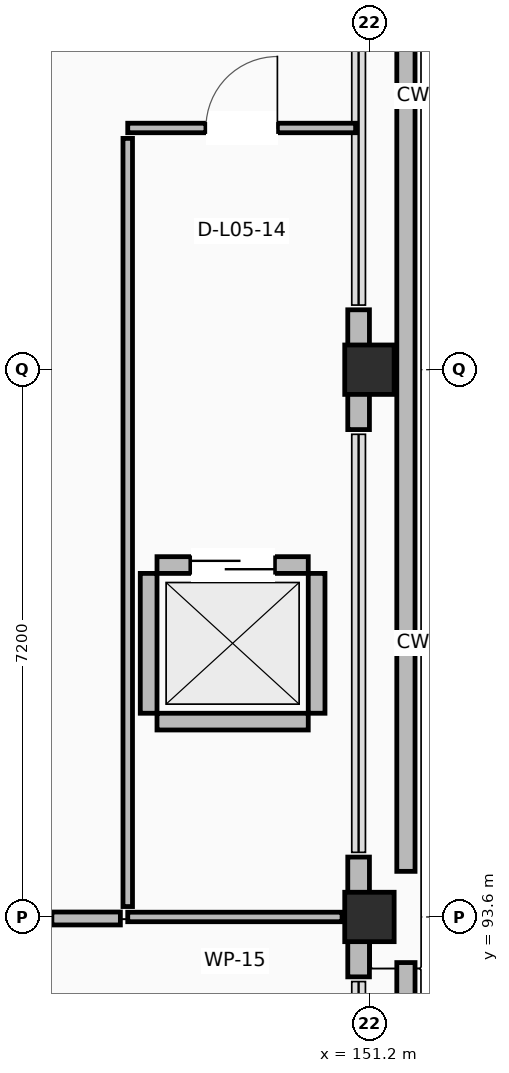
"""IFC4 building model, lengths in metres.
Left out: names, types, materials, properties, quantities, classifications, styles, units other than length and angle.
Written with IfcOpenShell. Run it as: python <this file> out.ifc"""

import sys

from ifc_helpers import new_model, si_unit, direction, frame, frame_2d, origin, origin_2d, place, context, subcontext, project, spatial, rectangle, extrude, element, fill, save


model = new_model("IFC4")
c1 = context("Model", 3, precision=1e-05, world=origin(), true_north=direction((0.0, 1.0)))
c2 = subcontext(c1, "Body", "Model", "MODEL_VIEW")
j1 = project(units=[si_unit("LENGTHUNIT", "METRE"), si_unit("PLANEANGLEUNIT", "RADIAN")], contexts=[c1])
p1 = place(None, origin())
s1 = spatial("IfcSite", under=j1, at=p1, CompositionType="ELEMENT")
p2 = place(p1, origin())
s2 = spatial("IfcBuilding", under=s1, at=p2, CompositionType="ELEMENT")
p3 = place(p2, frame((0.0, 0.0, 22.5)))
s3 = spatial("IfcBuildingStorey", under=s2, at=p3, CompositionType="ELEMENT", Elevation=22.5)
for number, where, z_axis, x_axis in (
    (1, (151.2, 93.6, 0.0), (0.0, 0.0, 1.0), (1.0, 0.0, 0.0)),
    (2, (151.2, 100.8, 0.0), (0.0, 0.0, 1.0), (1.0, 0.0, 0.0)),
):
    element("IfcColumn", number, at=place(p3, frame(where, z_axis=z_axis, x_axis=x_axis)), inside=s3, PredefinedType="COLUMN", context=c2, shape_type="SweptSolid", body=[
        extrude(rectangle(XDim=0.65, YDim=0.65, at=origin_2d()), origin(), (0.0, 0.0, 1.0), 4.22),
    ])
p4 = place(p3, frame((151.058, 92.812, 0.0), z_axis=(0.0, 0.0, 1.0), x_axis=(0.0, 1.0, 0.0)))
e3 = element("IfcWall", 3, at=p4, inside=s3, PredefinedType="STANDARD", context=c2, shape_type="SweptSolid", body=[
    extrude(rectangle(XDim=0.788, YDim=0.285, at=frame_2d((0.394, 0.0))), origin(), (0.0, 0.0, 1.0), 3.26),
])
p5 = place(p3, frame((151.058, 93.6, 0.0), z_axis=(0.0, 0.0, 1.0), x_axis=(0.0, 1.0, 0.0)))
e4 = element("IfcWall", 4, at=p5, inside=s3, PredefinedType="STANDARD", context=c2, shape_type="SweptSolid", body=[
    extrude(rectangle(XDim=0.788, YDim=0.285, at=frame_2d((0.394, 0.0))), origin(), (0.0, 0.0, 1.0), 3.26),
])
p6 = place(p3, frame((151.058, 100.012, 0.0), z_axis=(0.0, 0.0, 1.0), x_axis=(0.0, 1.0, 0.0)))
e5 = element("IfcWall", 5, at=p6, inside=s3, PredefinedType="STANDARD", context=c2, shape_type="SweptSolid", body=[
    extrude(rectangle(XDim=1.576, YDim=0.285, at=frame_2d((0.788, 0.0))), origin(), (0.0, 0.0, 1.0), 3.26),
])
p7 = place(p3, frame((151.68, 115.56, 0.0), z_axis=(0.0, 0.0, 1.0), x_axis=(0.0, -1.0, 0.0)))
e6 = element("IfcWall", 6, at=p7, inside=s3, PredefinedType="PARAPET", context=c2, shape_type="SweptSolid", body=[
    extrude(rectangle(XDim=21.36, YDim=0.24, at=frame_2d((10.68, 0.0))), origin(), (0.0, 0.0, 1.0), 1.12),
])
p8 = place(p3, frame((151.68, 93.0, 0.0), z_axis=(0.0, 0.0, 1.0), x_axis=(0.0, -1.0, 0.0)))
e7 = element("IfcWall", 7, at=p8, inside=s3, PredefinedType="PARAPET", context=c2, shape_type="SweptSolid", body=[
    extrude(rectangle(XDim=6.96, YDim=0.24, at=frame_2d((3.48, 0.0))), origin(), (0.0, 0.0, 1.0), 1.12),
])
p9 = place(p3, frame((148.405, 96.17, 0.0), z_axis=(0.0, 0.0, 1.0), x_axis=(1.0, 0.0, 0.0)))
e8 = element("IfcWall", 8, at=p9, inside=s3, PredefinedType="STANDARD", context=c2, shape_type="SweptSolid", body=[
    extrude(rectangle(XDim=1.99, YDim=0.22, at=frame_2d((0.995, 0.0))), origin(), (0.0, 0.0, 1.0), 3.26),
])
p10 = place(p3, frame((148.405, 98.23, 0.0), z_axis=(0.0, 0.0, 1.0), x_axis=(1.0, 0.0, 0.0)))
e9 = element("IfcWall", 9, at=p10, inside=s3, PredefinedType="STANDARD", context=c2, shape_type="SweptSolid", body=[
    extrude(rectangle(XDim=1.99, YDim=0.22, at=frame_2d((0.995, 0.0))), origin(), (0.0, 0.0, 1.0), 3.26),
])
p11 = place(p10, frame((0.445, 0.0, 0.0)))
e10 = element("IfcOpeningElement", 10, at=p11, cuts=e9, PredefinedType="OPENING", context=c2, shape_type="SweptSolid", body=[
    extrude(rectangle(XDim=1.1, YDim=2.15, at=frame_2d((0.55, 1.075))), frame((0.0, 0.12, 0.0), z_axis=(0.0, -1.0, 0.0), x_axis=(1.0, 0.0, 0.0)), (0.0, 0.0, 1.0), 0.24),
])
for number, where, z_axis, x_axis in (
    (11, (148.295, 96.28, 0.0), (0.0, 0.0, 1.0), (0.0, 1.0, 0.0)),
    (12, (150.505, 96.28, 0.0), (0.0, 0.0, 1.0), (0.0, 1.0, 0.0)),
):
    element("IfcWall", number, at=place(p3, frame(where, z_axis=z_axis, x_axis=x_axis)), inside=s3, PredefinedType="STANDARD", context=c2, shape_type="SweptSolid", body=[
        extrude(rectangle(XDim=1.84, YDim=0.22, at=frame_2d((0.92, 0.0))), origin(), (0.0, 0.0, 1.0), 3.26),
    ])
p12 = place(p3, frame((148.02, 103.98, 0.0), z_axis=(0.0, 0.0, 1.0), x_axis=(1.0, 0.0, 0.0)))
e13 = element("IfcWall", 13, at=p12, inside=s3, PredefinedType="PARTITIONING", context=c2, shape_type="SweptSolid", body=[
    extrude(rectangle(XDim=2.998, YDim=0.125, at=frame_2d((1.499, 0.0))), origin(), (0.0, 0.0, 1.0), 3.26),
])
p13 = place(p12, frame((1.029, 0.0, 0.0)))
e14 = element("IfcOpeningElement", 14, at=p13, cuts=e13, PredefinedType="OPENING", context=c2, shape_type="SweptSolid", body=[
    extrude(rectangle(XDim=0.94, YDim=2.1, at=frame_2d((0.47, 1.05))), frame((0.0, 0.073, 0.0), z_axis=(0.0, -1.0, 0.0), x_axis=(1.0, 0.0, 0.0)), (0.0, 0.0, 1.0), 0.145),
])
p14 = place(p3, frame((150.84, 93.6, 0.0), z_axis=(0.0, 0.0, 1.0), x_axis=(-1.0, 0.0, 0.0)))
e15 = element("IfcWall", 15, at=p14, inside=s3, PredefinedType="PARTITIONING", context=c2, shape_type="SweptSolid", body=[
    extrude(rectangle(XDim=2.82, YDim=0.125, at=frame_2d((1.41, 0.0))), origin(), (0.0, 0.0, 1.0), 3.26),
])
p15 = place(p3, frame((148.02, 93.737, 0.0), z_axis=(0.0, 0.0, 1.0), x_axis=(0.0, 1.0, 0.0)))
e16 = element("IfcWall", 16, at=p15, inside=s3, PredefinedType="PARTITIONING", context=c2, shape_type="SweptSolid", body=[
    extrude(rectangle(XDim=10.106, YDim=0.125, at=frame_2d((5.053, 0.0))), origin(), (0.0, 0.0, 1.0), 3.26),
])
p16 = place(p3, frame((145.0, 93.58, 0.0), z_axis=(0.0, 0.0, 1.0), x_axis=(1.0, 0.0, 0.0)))
e17 = element("IfcWall", 17, at=p16, inside=s3, PredefinedType="PARTITIONING", context=c2, shape_type="SweptSolid", body=[
    extrude(rectangle(XDim=2.923, YDim=0.17, at=frame_2d((1.461, 0.0))), origin(), (0.0, 0.0, 1.0), 3.26),
])
p17 = place(p16, frame((0.902, 0.0, 0.0)))
e18 = element("IfcOpeningElement", 18, at=p17, cuts=e17, PredefinedType="OPENING", context=c2, shape_type="SweptSolid", body=[
    extrude(rectangle(XDim=1.12, YDim=2.15, at=frame_2d((0.56, 1.075))), frame((0.0, 0.095, 0.0), z_axis=(0.0, -1.0, 0.0), x_axis=(1.0, 0.0, 0.0)), (0.0, 0.0, 1.0), 0.19),
])
p18 = place(p11, origin())
e19 = element("IfcDoor", 19, at=p18, inside=s3, OperationType="SLIDING_TO_RIGHT", PredefinedType="DOOR", context=c2, shape_type="SweptSolid", body=[
    extrude(rectangle(XDim=1.1, YDim=2.15, at=frame_2d((0.55, 1.075))), frame((0.0, 0.025, 0.0), z_axis=(0.0, -1.0, 0.0), x_axis=(1.0, 0.0, 0.0)), (0.0, 0.0, 1.0), 0.05),
])
fill(e10, e19)
p19 = place(p13, origin())
e20 = element("IfcDoor", 20, at=p19, inside=s3, OperationType="SINGLE_SWING_RIGHT", PredefinedType="DOOR", context=c2, shape_type="SweptSolid", body=[
    extrude(rectangle(XDim=0.94, YDim=2.1, at=frame_2d((0.47, 1.05))), frame((0.0, 0.025, 0.0), z_axis=(0.0, -1.0, 0.0), x_axis=(1.0, 0.0, 0.0)), (0.0, 0.0, 1.0), 0.05),
])
fill(e14, e20)
p20 = place(p17, origin())
e21 = element("IfcDoor", 21, at=p20, inside=s3, OperationType="SINGLE_SWING_LEFT", PredefinedType="DOOR", context=c2, shape_type="SweptSolid", body=[
    extrude(rectangle(XDim=1.12, YDim=2.15, at=frame_2d((0.56, 1.075))), frame((0.0, 0.025, 0.0), z_axis=(0.0, -1.0, 0.0), x_axis=(1.0, 0.0, 0.0)), (0.0, 0.0, 1.0), 0.05),
])
fill(e18, e21)
save(model, sys.argv[1])
